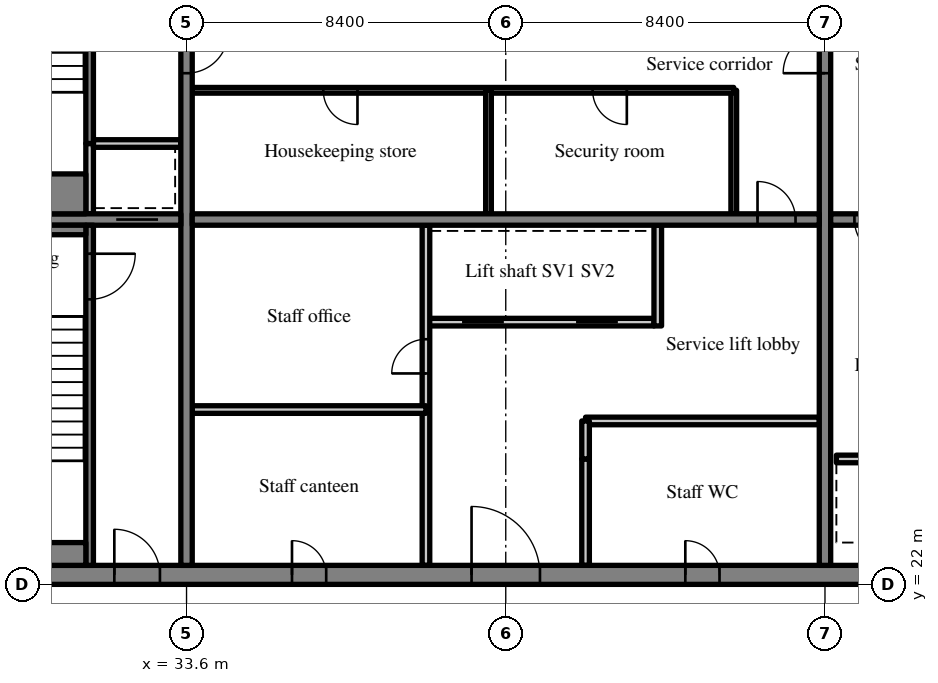
"""IFC4 building model, lengths in metres.
Left out: names, types, materials, properties, quantities, classifications, styles, units other than length and angle.
Written with IfcOpenShell. Run it as: python <this file> out.ifc"""

import sys

from ifc_helpers import new_model, si_unit, direction, frame, frame_2d, origin, place, context, subcontext, project, spatial, rectangle, extrude, source, transform, mapped, element, fill, save


model = new_model("IFC4")
c1 = context("Model", 3, precision=1e-05, world=origin(), true_north=direction((0.0, 1.0)))
c2 = subcontext(c1, "Body", "Model", "MODEL_VIEW")
j1 = project(units=[si_unit("LENGTHUNIT", "METRE"), si_unit("PLANEANGLEUNIT", "RADIAN")], contexts=[c1])
p1 = place(None, origin())
s1 = spatial("IfcSite", under=j1, at=p1, CompositionType="ELEMENT")
p2 = place(p1, origin())
s2 = spatial("IfcBuilding", under=s1, at=p2, CompositionType="ELEMENT")
p3 = place(p2, frame((0.0, 0.0, 301.7)))
s3 = spatial("IfcBuildingStorey", under=s2, at=p3, CompositionType="ELEMENT", Elevation=301.7)
m1 = source(origin(), c2, "Body", "SweptSolid", [
    extrude(rectangle(XDim=50.4, YDim=0.5, at=frame_2d((25.2, 0.0))), origin(), (0.0, 0.0, 1.0), 3.72),
])
p4 = place(p3, frame((25.2, 22.25, 0.0), z_axis=(0.0, 0.0, 1.0), x_axis=(1.0, 0.0, 0.0)))
e1 = element("IfcWall", 1, at=p4, inside=s3, PredefinedType="SHEAR", context=c2, shape_type="MappedRepresentation", body=[
    mapped(m1, transform((0.0, 0.0, 0.0), scale=1.0)),
])
m2 = source(origin(), c2, "Body", "SweptSolid", [
    extrude(rectangle(XDim=1.8, YDim=2.1, at=frame_2d((0.9, 1.05))), frame((0.0, 0.26, 0.0), z_axis=(0.0, -1.0, 0.0), x_axis=(1.0, 0.0, 0.0)), (0.0, 0.0, 1.0), 0.52),
])
p5 = place(p4, frame((15.9, 0.0, 0.0)))
e2 = element("IfcOpeningElement", 2, at=p5, cuts=e1, PredefinedType="OPENING", context=c2, shape_type="MappedRepresentation", body=[
    mapped(m2, transform((0.0, 0.0, 0.0), scale=1.0)),
])
m3 = source(origin(), c2, "Body", "SweptSolid", [
    extrude(rectangle(XDim=0.9, YDim=2.1, at=frame_2d((0.45, 1.05))), frame((0.0, 0.26, 0.0), z_axis=(0.0, -1.0, 0.0), x_axis=(1.0, 0.0, 0.0)), (0.0, 0.0, 1.0), 0.52),
])
p6 = place(p4, frame((11.175, 0.0, 0.0)))
e3 = element("IfcOpeningElement", 3, at=p6, cuts=e1, PredefinedType="OPENING", context=c2, shape_type="MappedRepresentation", body=[
    mapped(m3, transform((0.0, 0.0, 0.0), scale=1.0)),
])
p7 = place(p4, frame((21.525, 0.0, 0.0)))
e4 = element("IfcOpeningElement", 4, at=p7, cuts=e1, PredefinedType="OPENING", context=c2, shape_type="MappedRepresentation", body=[
    mapped(m3, transform((0.0, 0.0, 0.0), scale=1.0)),
])
p8 = place(p4, frame((32.7, 0.0, 0.0)))
e5 = element("IfcOpeningElement", 5, at=p8, cuts=e1, PredefinedType="OPENING", context=c2, shape_type="MappedRepresentation", body=[
    mapped(m2, transform((0.0, 0.0, 0.0), scale=1.0)),
])
m4 = source(origin(), c2, "Body", "SweptSolid", [
    extrude(rectangle(XDim=1.2, YDim=2.1, at=frame_2d((0.6, 1.05))), frame((0.0, 0.26, 0.0), z_axis=(0.0, -1.0, 0.0), x_axis=(1.0, 0.0, 0.0)), (0.0, 0.0, 1.0), 0.52),
])
p9 = place(p4, frame((6.5, 0.0, 0.0)))
e6 = element("IfcOpeningElement", 6, at=p9, cuts=e1, PredefinedType="OPENING", context=c2, shape_type="MappedRepresentation", body=[
    mapped(m4, transform((0.0, 0.0, 0.0), scale=1.0)),
])
p10 = place(p4, frame((47.975, 0.0, 0.0)))
e7 = element("IfcOpeningElement", 7, at=p10, cuts=e1, PredefinedType="OPENING", context=c2, shape_type="MappedRepresentation", body=[
    mapped(m4, transform((0.0, 0.0, 0.0), scale=1.0)),
])
m5 = source(origin(), c2, "Body", "SweptSolid", [
    extrude(rectangle(XDim=19.0, YDim=0.3, at=frame_2d((9.5, 0.0))), origin(), (0.0, 0.0, 1.0), 3.72),
])
p11 = place(p3, frame((33.6, 22.5, 0.0), z_axis=(0.0, 0.0, 1.0), x_axis=(0.0, 1.0, 0.0)))
e8 = element("IfcWall", 8, at=p11, inside=s3, PredefinedType="SHEAR", context=c2, shape_type="MappedRepresentation", body=[
    mapped(m5, transform((0.0, 0.0, 0.0), scale=1.0)),
])
m6 = source(origin(), c2, "Body", "SweptSolid", [
    extrude(rectangle(XDim=1.1, YDim=2.1, at=frame_2d((0.55, 1.05))), frame((0.0, 0.16, 0.0), z_axis=(0.0, -1.0, 0.0), x_axis=(1.0, 0.0, 0.0)), (0.0, 0.0, 1.0), 0.32),
])
p12 = place(p11, frame((12.95, 0.0, 0.0)))
e9 = element("IfcOpeningElement", 9, at=p12, cuts=e8, PredefinedType="OPENING", context=c2, shape_type="MappedRepresentation", body=[
    mapped(m6, transform((0.0, 0.0, 0.0), scale=1.0)),
])
p13 = place(p3, frame((50.4, 22.5, 0.0), z_axis=(0.0, 0.0, 1.0), x_axis=(0.0, 1.0, 0.0)))
e10 = element("IfcWall", 10, at=p13, inside=s3, PredefinedType="SHEAR", context=c2, shape_type="MappedRepresentation", body=[
    mapped(m5, transform((0.0, 0.0, 0.0), scale=1.0)),
])
p14 = place(p13, frame((12.95, 0.0, 0.0)))
e11 = element("IfcOpeningElement", 11, at=p14, cuts=e10, PredefinedType="OPENING", context=c2, shape_type="MappedRepresentation", body=[
    mapped(m6, transform((0.0, 0.0, 0.0), scale=1.0)),
])
m7 = source(origin(), c2, "Body", "SweptSolid", [
    extrude(rectangle(XDim=7.75, YDim=0.3, at=frame_2d((3.875, 0.0))), origin(), (0.0, 0.0, 1.0), 3.72),
])
p15 = place(p3, frame((25.7, 31.6, 0.0), z_axis=(0.0, 0.0, 1.0), x_axis=(1.0, 0.0, 0.0)))
e12 = element("IfcWall", 12, at=p15, inside=s3, PredefinedType="SHEAR", context=c2, shape_type="MappedRepresentation", body=[
    mapped(m7, transform((0.0, 0.0, 0.0), scale=1.0)),
])
p16 = place(p15, frame((6.05, 0.0, 0.0)))
e13 = element("IfcOpeningElement", 13, at=p16, cuts=e12, PredefinedType="OPENING", context=c2, shape_type="MappedRepresentation", body=[
    mapped(m6, transform((0.0, 0.0, 0.0), scale=1.0)),
])
m8 = source(origin(), c2, "Body", "SweptSolid", [
    extrude(rectangle(XDim=16.5, YDim=0.3, at=frame_2d((8.25, 0.0))), origin(), (0.0, 0.0, 1.0), 3.72),
])
p17 = place(p3, frame((33.75, 31.6, 0.0), z_axis=(0.0, 0.0, 1.0), x_axis=(1.0, 0.0, 0.0)))
e14 = element("IfcWall", 14, at=p17, inside=s3, PredefinedType="SHEAR", context=c2, shape_type="MappedRepresentation", body=[
    mapped(m8, transform((0.0, 0.0, 0.0), scale=1.0)),
])
m9 = source(origin(), c2, "Body", "SweptSolid", [
    extrude(rectangle(XDim=1.0, YDim=2.1, at=frame_2d((0.5, 1.05))), frame((0.0, 0.16, 0.0), z_axis=(0.0, -1.0, 0.0), x_axis=(1.0, 0.0, 0.0)), (0.0, 0.0, 1.0), 0.32),
])
p18 = place(p17, frame((14.875, 0.0, 0.0)))
e15 = element("IfcOpeningElement", 15, at=p18, cuts=e14, PredefinedType="OPENING", context=c2, shape_type="MappedRepresentation", body=[
    mapped(m9, transform((0.0, 0.0, 0.0), scale=1.0)),
])
p19 = place(p3, frame((50.55, 31.6, 0.0), z_axis=(0.0, 0.0, 1.0), x_axis=(1.0, 0.0, 0.0)))
e16 = element("IfcWall", 16, at=p19, inside=s3, PredefinedType="SHEAR", context=c2, shape_type="MappedRepresentation", body=[
    mapped(m8, transform((0.0, 0.0, 0.0), scale=1.0)),
])
p20 = place(p19, frame((0.625, 0.0, 0.0)))
e17 = element("IfcOpeningElement", 17, at=p20, cuts=e16, PredefinedType="OPENING", context=c2, shape_type="MappedRepresentation", body=[
    mapped(m9, transform((0.0, 0.0, 0.0), scale=1.0)),
])
m10 = source(origin(), c2, "Body", "SweptSolid", [
    extrude(rectangle(XDim=6.0, YDim=0.2, at=frame_2d((3.0, 0.0))), origin(), (0.0, 0.0, 1.0), 3.72),
])
p21 = place(p3, frame((39.9, 28.9, 0.0), z_axis=(0.0, 0.0, 1.0), x_axis=(1.0, 0.0, 0.0)))
e18 = element("IfcWall", 18, at=p21, inside=s3, PredefinedType="SOLIDWALL", context=c2, shape_type="MappedRepresentation", body=[
    mapped(m10, transform((0.0, 0.0, 0.0), scale=1.0)),
])
m11 = source(origin(), c2, "Body", "SweptSolid", [
    extrude(rectangle(XDim=1.1, YDim=2.1, at=frame_2d((0.55, 1.05))), frame((0.0, 0.11, 0.0), z_axis=(0.0, -1.0, 0.0), x_axis=(1.0, 0.0, 0.0)), (0.0, 0.0, 1.0), 0.22),
])
p22 = place(p21, frame((0.95, 0.0, 0.0)))
e19 = element("IfcOpeningElement", 19, at=p22, cuts=e18, PredefinedType="OPENING", context=c2, shape_type="MappedRepresentation", body=[
    mapped(m11, transform((0.0, 0.0, 0.0), scale=1.0)),
])
p23 = place(p21, frame((3.95, 0.0, 0.0)))
e20 = element("IfcOpeningElement", 20, at=p23, cuts=e18, PredefinedType="OPENING", context=c2, shape_type="MappedRepresentation", body=[
    mapped(m11, transform((0.0, 0.0, 0.0), scale=1.0)),
])
m12 = source(origin(), c2, "Body", "SweptSolid", [
    extrude(rectangle(XDim=8.95, YDim=0.2, at=frame_2d((4.475, 0.0))), origin(), (0.0, 0.0, 1.0), 3.72),
])
p24 = place(p3, frame((39.9, 22.5, 0.0), z_axis=(0.0, 0.0, 1.0), x_axis=(0.0, 1.0, 0.0)))
e21 = element("IfcWall", 21, at=p24, inside=s3, PredefinedType="PARTITIONING", context=c2, shape_type="MappedRepresentation", body=[
    mapped(m12, transform((0.0, 0.0, 0.0), scale=1.0)),
])
m13 = source(origin(), c2, "Body", "SweptSolid", [
    extrude(rectangle(XDim=0.9, YDim=2.1, at=frame_2d((0.45, 1.05))), frame((0.0, 0.11, 0.0), z_axis=(0.0, -1.0, 0.0), x_axis=(1.0, 0.0, 0.0)), (0.0, 0.0, 1.0), 0.22),
])
p25 = place(p24, frame((5.05, 0.0, 0.0)))
e22 = element("IfcOpeningElement", 22, at=p25, cuts=e21, PredefinedType="OPENING", context=c2, shape_type="MappedRepresentation", body=[
    mapped(m13, transform((0.0, 0.0, 0.0), scale=1.0)),
])
m14 = source(origin(), c2, "Body", "SweptSolid", [
    extrude(rectangle(XDim=2.8, YDim=0.2, at=frame_2d((1.4, 0.0))), origin(), (0.0, 0.0, 1.0), 3.72),
])
p26 = place(p3, frame((44.1, 22.5, 0.0), z_axis=(0.0, 0.0, 1.0), x_axis=(0.0, 1.0, 0.0)))
e23 = element("IfcWall", 23, at=p26, inside=s3, PredefinedType="PARTITIONING", context=c2, shape_type="MappedRepresentation", body=[
    mapped(m14, transform((0.0, 0.0, 0.0), scale=1.0)),
])
m15 = source(origin(), c2, "Body", "SweptSolid", [
    extrude(rectangle(XDim=2.65, YDim=0.2, at=frame_2d((1.325, 0.0))), origin(), (0.0, 0.0, 1.0), 3.72),
])
p27 = place(p3, frame((46.0, 28.8, 0.0), z_axis=(0.0, 0.0, 1.0), x_axis=(0.0, 1.0, 0.0)))
e24 = element("IfcWall", 24, at=p27, inside=s3, PredefinedType="SOLIDWALL", context=c2, shape_type="MappedRepresentation", body=[
    mapped(m15, transform((0.0, 0.0, 0.0), scale=1.0)),
])
m16 = source(origin(), c2, "Body", "SweptSolid", [
    extrude(rectangle(XDim=6.15, YDim=0.2, at=frame_2d((3.075, 0.0))), origin(), (0.0, 0.0, 1.0), 3.72),
])
for number, where, z_axis, x_axis in (
    (25, (33.75, 26.6, 0.0), (0.0, 0.0, 1.0), (1.0, 0.0, 0.0)),
    (26, (44.1, 26.3, 0.0), (0.0, 0.0, 1.0), (1.0, 0.0, 0.0)),
):
    element("IfcWall", number, at=place(p3, frame(where, z_axis=z_axis, x_axis=x_axis)), inside=s3, PredefinedType="PARTITIONING", context=c2, shape_type="MappedRepresentation", body=[
        mapped(m16, transform((0.0, 0.0, 0.0), scale=1.0)),
    ])
m17 = source(origin(), c2, "Body", "SweptSolid", [
    extrude(rectangle(XDim=1.0, YDim=0.2, at=frame_2d((0.5, 0.0))), origin(), (0.0, 0.0, 1.0), 3.72),
])
p28 = place(p3, frame((44.1, 25.3, 0.0), z_axis=(0.0, 0.0, 1.0), x_axis=(0.0, 1.0, 0.0)))
e27 = element("IfcWall", 27, at=p28, inside=s3, PredefinedType="PARTITIONING", context=c2, shape_type="MappedRepresentation", body=[
    mapped(m17, transform((0.0, 0.0, 0.0), scale=1.0)),
])
m18 = source(origin(), c2, "Body", "SweptSolid", [
    extrude(rectangle(XDim=3.25, YDim=0.15, at=frame_2d((1.625, 0.0))), origin(), (0.0, 0.0, 1.0), 3.72),
])
p29 = place(p3, frame((48.0, 31.75, 0.0), z_axis=(0.0, 0.0, 1.0), x_axis=(0.0, 1.0, 0.0)))
e28 = element("IfcWall", 28, at=p29, inside=s3, PredefinedType="PARTITIONING", context=c2, shape_type="MappedRepresentation", body=[
    mapped(m18, transform((0.0, 0.0, 0.0), scale=1.0)),
])
m19 = source(origin(), c2, "Body", "SweptSolid", [
    extrude(rectangle(XDim=14.25, YDim=0.15, at=frame_2d((7.125, 0.0))), origin(), (0.0, 0.0, 1.0), 3.72),
])
p30 = place(p3, frame((33.75, 35.0, 0.0), z_axis=(0.0, 0.0, 1.0), x_axis=(1.0, 0.0, 0.0)))
e29 = element("IfcWall", 29, at=p30, inside=s3, PredefinedType="PARTITIONING", context=c2, shape_type="MappedRepresentation", body=[
    mapped(m19, transform((0.0, 0.0, 0.0), scale=1.0)),
])
m20 = source(origin(), c2, "Body", "SweptSolid", [
    extrude(rectangle(XDim=0.9, YDim=2.1, at=frame_2d((0.45, 1.05))), frame((0.0, 0.085, 0.0), z_axis=(0.0, -1.0, 0.0), x_axis=(1.0, 0.0, 0.0)), (0.0, 0.0, 1.0), 0.17),
])
p31 = place(p30, frame((3.448, 0.0, 0.0)))
e30 = element("IfcOpeningElement", 30, at=p31, cuts=e29, PredefinedType="OPENING", context=c2, shape_type="MappedRepresentation", body=[
    mapped(m20, transform((0.0, 0.0, 0.0), scale=1.0)),
])
p32 = place(p30, frame((10.536, 0.0, 0.0)))
e31 = element("IfcOpeningElement", 31, at=p32, cuts=e29, PredefinedType="OPENING", context=c2, shape_type="MappedRepresentation", body=[
    mapped(m20, transform((0.0, 0.0, 0.0), scale=1.0)),
])
p33 = place(p3, frame((41.546, 31.75, 0.0), z_axis=(0.0, 0.0, 1.0), x_axis=(0.0, 1.0, 0.0)))
e32 = element("IfcWall", 32, at=p33, inside=s3, PredefinedType="PARTITIONING", context=c2, shape_type="MappedRepresentation", body=[
    mapped(m18, transform((0.0, 0.0, 0.0), scale=1.0)),
])
p34 = place(p3, frame((56.7, 25.3, 0.0), z_axis=(0.0, 0.0, 1.0), x_axis=(-1.0, 0.0, 0.0)))
e33 = element("IfcWall", 33, at=p34, inside=s3, PredefinedType="SOLIDWALL", context=c2, shape_type="MappedRepresentation", body=[
    mapped(m10, transform((0.0, 0.0, 0.0), scale=1.0)),
])
p35 = place(p34, frame((0.95, 0.0, 0.0)))
e34 = element("IfcOpeningElement", 34, at=p35, cuts=e33, PredefinedType="OPENING", context=c2, shape_type="MappedRepresentation", body=[
    mapped(m11, transform((0.0, 0.0, 0.0), scale=1.0)),
])
p36 = place(p34, frame((3.95, 0.0, 0.0)))
e35 = element("IfcOpeningElement", 35, at=p36, cuts=e33, PredefinedType="OPENING", context=c2, shape_type="MappedRepresentation", body=[
    mapped(m11, transform((0.0, 0.0, 0.0), scale=1.0)),
])
m21 = source(origin(), c2, "Body", "SweptSolid", [
    extrude(rectangle(XDim=8.95, YDim=0.2, at=frame_2d((4.475, 0.0))), origin(), (0.0, 0.0, 1.0), 3.72),
])
p37 = place(p3, frame((31.05, 22.5, 0.0), z_axis=(0.0, 0.0, 1.0), x_axis=(0.0, 1.0, 0.0)))
e36 = element("IfcWall", 36, at=p37, inside=s3, PredefinedType="SOLIDWALL", context=c2, shape_type="MappedRepresentation", body=[
    mapped(m21, transform((0.0, 0.0, 0.0), scale=1.0)),
])
m22 = source(origin(), c2, "Body", "SweptSolid", [
    extrude(rectangle(XDim=1.2, YDim=2.1, at=frame_2d((0.6, 1.05))), frame((0.0, 0.11, 0.0), z_axis=(0.0, -1.0, 0.0), x_axis=(1.0, 0.0, 0.0)), (0.0, 0.0, 1.0), 0.22),
])
p38 = place(p37, frame((7.0, 0.0, 0.0)))
e37 = element("IfcOpeningElement", 37, at=p38, cuts=e36, PredefinedType="OPENING", context=c2, shape_type="MappedRepresentation", body=[
    mapped(m22, transform((0.0, 0.0, 0.0), scale=1.0)),
])
m23 = source(origin(), c2, "Body", "SweptSolid", [
    extrude(rectangle(XDim=1.85, YDim=0.2, at=frame_2d((0.925, 0.0))), origin(), (0.0, 0.0, 1.0), 3.72),
])
p39 = place(p3, frame((31.05, 31.75, 0.0), z_axis=(0.0, 0.0, 1.0), x_axis=(0.0, 1.0, 0.0)))
e38 = element("IfcWall", 38, at=p39, inside=s3, PredefinedType="SOLIDWALL", context=c2, shape_type="MappedRepresentation", body=[
    mapped(m23, transform((0.0, 0.0, 0.0), scale=1.0)),
])
m24 = source(origin(), c2, "Body", "SweptSolid", [
    extrude(rectangle(XDim=2.3, YDim=0.2, at=frame_2d((1.15, 0.0))), origin(), (0.0, 0.0, 1.0), 3.72),
])
p40 = place(p3, frame((31.15, 33.6, 0.0), z_axis=(0.0, 0.0, 1.0), x_axis=(1.0, 0.0, 0.0)))
e39 = element("IfcWall", 39, at=p40, inside=s3, PredefinedType="SOLIDWALL", context=c2, shape_type="MappedRepresentation", body=[
    mapped(m24, transform((0.0, 0.0, 0.0), scale=1.0)),
])
m25 = source(origin(), c2, "Body", "SweptSolid", [
    extrude(rectangle(XDim=7.9, YDim=0.2, at=frame_2d((3.95, 0.0))), origin(), (0.0, 0.0, 1.0), 3.72),
])
p41 = place(p3, frame((31.05, 33.6, 0.0), z_axis=(0.0, 0.0, 1.0), x_axis=(0.0, 1.0, 0.0)))
e40 = element("IfcWall", 40, at=p41, inside=s3, PredefinedType="SOLIDWALL", context=c2, shape_type="MappedRepresentation", body=[
    mapped(m25, transform((0.0, 0.0, 0.0), scale=1.0)),
])
m26 = source(origin(), c2, "Body", "SweptSolid", [
    extrude(rectangle(XDim=1.8, YDim=2.1, at=frame_2d((0.9, 1.05))), frame((0.0, 0.11, 0.0), z_axis=(0.0, -1.0, 0.0), x_axis=(1.0, 0.0, 0.0)), (0.0, 0.0, 1.0), 0.22),
])
p42 = place(p41, frame((5.3, 0.0, 0.0)))
e41 = element("IfcOpeningElement", 41, at=p42, cuts=e40, PredefinedType="OPENING", context=c2, shape_type="MappedRepresentation", body=[
    mapped(m26, transform((0.0, 0.0, 0.0), scale=1.0)),
])
m27 = source(origin(), c2, "Body", "SweptSolid", [
    extrude(rectangle(XDim=5.25, YDim=0.6, at=frame_2d((2.625, 0.0))), origin(), (0.0, 0.0, 1.0), 3.72),
])
p43 = place(p3, frame((25.7, 22.8, 0.0), z_axis=(0.0, 0.0, 1.0), x_axis=(1.0, 0.0, 0.0)))
e42 = element("IfcWall", 42, at=p43, inside=s3, PredefinedType="SOLIDWALL", context=c2, shape_type="MappedRepresentation", body=[
    mapped(m27, transform((0.0, 0.0, 0.0), scale=1.0)),
])
m28 = source(origin(), c2, "Body", "SweptSolid", [
    extrude(rectangle(XDim=5.25, YDim=0.25, at=frame_2d((2.625, 0.0))), origin(), (0.0, 0.0, 1.0), 3.72),
])
p44 = place(p3, frame((25.7, 31.325, 0.0), z_axis=(0.0, 0.0, 1.0), x_axis=(1.0, 0.0, 0.0)))
e43 = element("IfcWall", 43, at=p44, inside=s3, PredefinedType="SOLIDWALL", context=c2, shape_type="MappedRepresentation", body=[
    mapped(m28, transform((0.0, 0.0, 0.0), scale=1.0)),
])
m29 = source(origin(), c2, "Body", "SweptSolid", [
    extrude(rectangle(XDim=5.25, YDim=1.05, at=frame_2d((2.625, 0.0))), origin(), (0.0, 0.0, 1.0), 3.72),
])
p45 = place(p3, frame((25.7, 32.275, 0.0), z_axis=(0.0, 0.0, 1.0), x_axis=(1.0, 0.0, 0.0)))
e44 = element("IfcWall", 44, at=p45, inside=s3, PredefinedType="SOLIDWALL", context=c2, shape_type="MappedRepresentation", body=[
    mapped(m29, transform((0.0, 0.0, 0.0), scale=1.0)),
])
m30 = source(origin(), c2, "Body", "SweptSolid", [
    extrude(rectangle(XDim=1.8, YDim=2.1, at=frame_2d((0.9, 1.05))), frame((0.0, 0.175, 0.0), z_axis=(0.0, -1.0, 0.0), x_axis=(1.0, 0.0, 0.0)), (0.0, 0.0, 1.0), 0.05),
])
p46 = place(p5, origin())
e45 = element("IfcDoor", 45, at=p46, inside=s3, OperationType="DOUBLE_DOOR_SINGLE_SWING", PredefinedType="DOOR", context=c2, shape_type="MappedRepresentation", body=[
    mapped(m30, transform((0.0, 0.0, 0.0), scale=1.0)),
])
fill(e2, e45)
m31 = source(origin(), c2, "Body", "SweptSolid", [
    extrude(rectangle(XDim=1.0, YDim=2.1, at=frame_2d((0.5, 1.05))), frame((0.0, 0.025, 0.0), z_axis=(0.0, -1.0, 0.0), x_axis=(1.0, 0.0, 0.0)), (0.0, 0.0, 1.0), 0.05),
])
p47 = place(p18, origin())
e46 = element("IfcDoor", 46, at=p47, inside=s3, OperationType="SINGLE_SWING_LEFT", PredefinedType="DOOR", context=c2, shape_type="MappedRepresentation", body=[
    mapped(m31, transform((0.0, 0.0, 0.0), scale=1.0)),
])
fill(e15, e46)
m32 = source(origin(), c2, "Body", "SweptSolid", [
    extrude(rectangle(XDim=1.1, YDim=2.1, at=frame_2d((0.55, 1.05))), frame((0.0, 0.025, 0.0), z_axis=(0.0, -1.0, 0.0), x_axis=(1.0, 0.0, 0.0)), (0.0, 0.0, 1.0), 0.05),
])
p48 = place(p22, origin())
e47 = element("IfcDoor", 47, at=p48, inside=s3, OperationType="SLIDING_TO_LEFT", PredefinedType="DOOR", context=c2, shape_type="MappedRepresentation", body=[
    mapped(m32, transform((0.0, 0.0, 0.0), scale=1.0)),
])
fill(e19, e47)
p49 = place(p23, origin())
e48 = element("IfcDoor", 48, at=p49, inside=s3, OperationType="SLIDING_TO_RIGHT", PredefinedType="DOOR", context=c2, shape_type="MappedRepresentation", body=[
    mapped(m32, transform((0.0, 0.0, 0.0), scale=1.0)),
])
fill(e20, e48)
m33 = source(origin(), c2, "Body", "SweptSolid", [
    extrude(rectangle(XDim=0.9, YDim=2.1, at=frame_2d((0.45, 1.05))), frame((0.0, 0.175, 0.0), z_axis=(0.0, -1.0, 0.0), x_axis=(1.0, 0.0, 0.0)), (0.0, 0.0, 1.0), 0.05),
])
p50 = place(p6, origin())
e49 = element("IfcDoor", 49, at=p50, inside=s3, OperationType="SINGLE_SWING_LEFT", PredefinedType="DOOR", context=c2, shape_type="MappedRepresentation", body=[
    mapped(m33, transform((0.0, 0.0, 0.0), scale=1.0)),
])
fill(e3, e49)
m34 = source(origin(), c2, "Body", "SweptSolid", [
    extrude(rectangle(XDim=0.9, YDim=2.1, at=frame_2d((0.45, 1.05))), frame((0.0, 0.025, 0.0), z_axis=(0.0, -1.0, 0.0), x_axis=(1.0, 0.0, 0.0)), (0.0, 0.0, 1.0), 0.05),
])
p51 = place(p25, origin())
e50 = element("IfcDoor", 50, at=p51, inside=s3, OperationType="SINGLE_SWING_LEFT", PredefinedType="DOOR", context=c2, shape_type="MappedRepresentation", body=[
    mapped(m34, transform((0.0, 0.0, 0.0), scale=1.0)),
])
fill(e22, e50)
p52 = place(p7, origin())
e51 = element("IfcDoor", 51, at=p52, inside=s3, OperationType="SINGLE_SWING_LEFT", PredefinedType="DOOR", context=c2, shape_type="MappedRepresentation", body=[
    mapped(m33, transform((0.0, 0.0, 0.0), scale=1.0)),
])
fill(e4, e51)
p53 = place(p31, origin())
e52 = element("IfcDoor", 52, at=p53, inside=s3, OperationType="SINGLE_SWING_RIGHT", PredefinedType="DOOR", context=c2, shape_type="MappedRepresentation", body=[
    mapped(m34, transform((0.0, 0.0, 0.0), scale=1.0)),
])
fill(e30, e52)
p54 = place(p32, origin())
e53 = element("IfcDoor", 53, at=p54, inside=s3, OperationType="SINGLE_SWING_RIGHT", PredefinedType="DOOR", context=c2, shape_type="MappedRepresentation", body=[
    mapped(m34, transform((0.0, 0.0, 0.0), scale=1.0)),
])
fill(e31, e53)
p55 = place(p20, origin())
e54 = element("IfcDoor", 54, at=p55, inside=s3, OperationType="SINGLE_SWING_RIGHT", PredefinedType="DOOR", context=c2, shape_type="MappedRepresentation", body=[
    mapped(m31, transform((0.0, 0.0, 0.0), scale=1.0)),
])
fill(e17, e54)
m35 = source(origin(), c2, "Body", "SweptSolid", [
    extrude(rectangle(XDim=1.2, YDim=2.1, at=frame_2d((0.6, 1.05))), frame((0.0, 0.025, 0.0), z_axis=(0.0, -1.0, 0.0), x_axis=(1.0, 0.0, 0.0)), (0.0, 0.0, 1.0), 0.05),
])
p56 = place(p38, origin())
e55 = element("IfcDoor", 55, at=p56, inside=s3, OperationType="SINGLE_SWING_RIGHT", PredefinedType="DOOR", context=c2, shape_type="MappedRepresentation", body=[
    mapped(m35, transform((0.0, 0.0, 0.0), scale=1.0)),
])
fill(e37, e55)
m36 = source(origin(), c2, "Body", "SweptSolid", [
    extrude(rectangle(XDim=1.2, YDim=2.1, at=frame_2d((0.6, 1.05))), frame((0.0, 0.175, 0.0), z_axis=(0.0, -1.0, 0.0), x_axis=(1.0, 0.0, 0.0)), (0.0, 0.0, 1.0), 0.05),
])
p57 = place(p9, origin())
e56 = element("IfcDoor", 56, at=p57, inside=s3, OperationType="SINGLE_SWING_LEFT", PredefinedType="DOOR", context=c2, shape_type="MappedRepresentation", body=[
    mapped(m36, transform((0.0, 0.0, 0.0), scale=1.0)),
])
fill(e6, e56)
p58 = place(p16, origin())
e57 = element("IfcDoor", 57, at=p58, inside=s3, OperationType="SLIDING_TO_LEFT", PredefinedType="DOOR", context=c2, shape_type="MappedRepresentation", body=[
    mapped(m32, transform((0.0, 0.0, 0.0), scale=1.0)),
])
fill(e13, e57)
p59 = place(p12, origin())
e58 = element("IfcDoor", 58, at=p59, inside=s3, OperationType="SINGLE_SWING_RIGHT", PredefinedType="DOOR", context=c2, shape_type="MappedRepresentation", body=[
    mapped(m32, transform((0.0, 0.0, 0.0), scale=1.0)),
])
fill(e9, e58)
p60 = place(p14, origin())
e59 = element("IfcDoor", 59, at=p60, inside=s3, OperationType="SINGLE_SWING_LEFT", PredefinedType="DOOR", context=c2, shape_type="MappedRepresentation", body=[
    mapped(m32, transform((0.0, 0.0, 0.0), scale=1.0)),
])
fill(e11, e59)
save(model, sys.argv[1])
